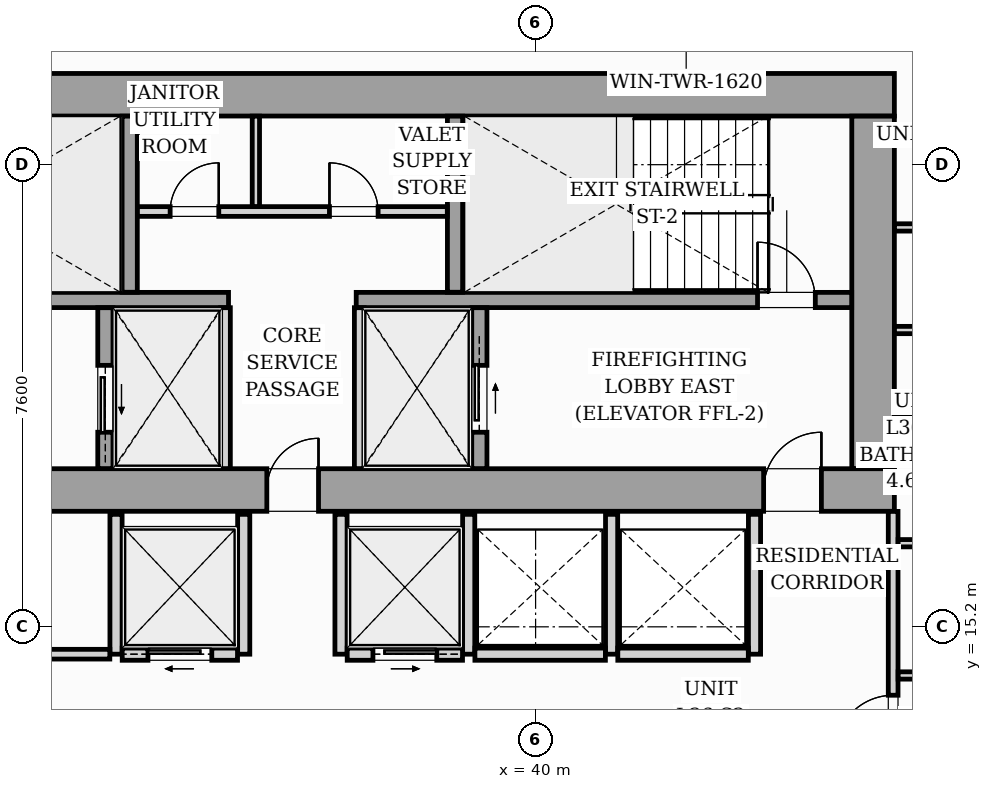
"""IFC4 building model, lengths in metres.
Left out: names, types, materials, properties, quantities, classifications, styles, units other than length and angle.
Written with IfcOpenShell. Run it as: python <this file> out.ifc"""

import sys

from ifc_helpers import new_model, si_unit, direction, frame, frame_2d, origin, origin_2d, place, context, subcontext, project, spatial, rectangle, i_section, extrude, source, transform, mapped, element, fill, save


model = new_model("IFC4")
c1 = context("Model", 3, precision=1e-05, world=origin(), true_north=direction((0.0, 1.0)))
c2 = subcontext(c1, "Body", "Model", "MODEL_VIEW")
j1 = project(units=[si_unit("LENGTHUNIT", "METRE"), si_unit("PLANEANGLEUNIT", "RADIAN")], contexts=[c1])
p1 = place(None, origin())
s1 = spatial("IfcSite", under=j1, at=p1, CompositionType="ELEMENT")
p2 = place(p1, origin())
s2 = spatial("IfcBuilding", under=s1, at=p2, CompositionType="ELEMENT")
p3 = place(p2, frame((0.0, 0.0, 127.8)))
s3 = spatial("IfcBuildingStorey", under=s2, at=p3, CompositionType="ELEMENT", Elevation=127.8)
m1 = source(origin(), c2, "Body", "SweptSolid", [
    extrude(i_section(OverallWidth=0.421, OverallDepth=0.465, WebThickness=0.045, FlangeThickness=0.073, FilletRadius=0.018, at=origin_2d()), origin(), (0.0, 0.0, 1.0), 3.196),
])
for number, where, z_axis, x_axis in (
    (1, (33.12, 17.4, 0.002), (0.0, 0.0, 1.0), (1.0, 0.0, 0.0)),
    (2, (38.88, 17.4, 0.002), (0.0, 0.0, 1.0), (1.0, 0.0, 0.0)),
    (3, (45.6, 17.4, 0.002), (0.0, 0.0, 1.0), (1.0, 0.0, 0.0)),
    (4, (33.12, 24.0, 0.002), (0.0, 0.0, 1.0), (1.0, 0.0, 0.0)),
    (5, (38.88, 24.0, 0.002), (0.0, 0.0, 1.0), (1.0, 0.0, 0.0)),
    (6, (45.6, 24.0, 0.002), (0.0, 0.0, 1.0), (1.0, 0.0, 0.0)),
):
    element("IfcColumn", number, at=place(p3, frame(where, z_axis=z_axis, x_axis=x_axis)), inside=s3, PredefinedType="PILASTER", context=c2, shape_type="MappedRepresentation", body=[
        mapped(m1, transform((0.0, 0.0, 0.0), scale=1.0)),
    ])
p4 = place(p3, frame((40.983, 25.727, 0.0), z_axis=(0.0, 0.0, 1.0), x_axis=(0.995395844771, -0.095849424686, 0.0)))
e7 = element("IfcWall", 7, at=p4, inside=s3, PredefinedType="STANDARD", context=c2, shape_type="SweptSolid", body=[
    extrude(rectangle(XDim=17.01, YDim=0.26, at=frame_2d((8.505, 0.0))), origin(), (0.0, 0.0, 1.0), 2.94),
])
p5 = place(p4, frame((9.25, 0.0, 0.0)))
e8 = element("IfcOpeningElement", 8, at=p5, cuts=e7, PredefinedType="OPENING", context=c2, shape_type="SweptSolid", body=[
    extrude(rectangle(XDim=1.8, YDim=2.06, at=frame_2d((0.9, 1.03))), frame((0.0, 0.14, 0.0), z_axis=(0.0, -1.0, 0.0), x_axis=(1.0, 0.0, 0.0)), (0.0, 0.0, 1.0), 0.28),
])
p6 = place(p4, frame((0.7, 0.0, 0.65)))
e9 = element("IfcOpeningElement", 9, at=p6, cuts=e7, PredefinedType="OPENING", context=c2, shape_type="SweptSolid", body=[
    extrude(rectangle(XDim=1.6, YDim=1.5, at=frame_2d((0.8, 0.75))), frame((0.0, 0.14, 0.0), z_axis=(0.0, -1.0, 0.0), x_axis=(1.0, 0.0, 0.0)), (0.0, 0.0, 1.0), 0.28),
])
p7 = place(p3, frame((26.1, 17.45, 0.0), z_axis=(0.0, 0.0, 1.0), x_axis=(1.0, 0.0, 0.0)))
e10 = element("IfcWall", 10, at=p7, inside=s3, PredefinedType="SHEAR", context=c2, shape_type="SweptSolid", body=[
    extrude(rectangle(XDim=19.8, YDim=0.7, at=frame_2d((9.9, 0.0))), origin(), (0.0, 0.0, 1.0), 3.2),
])
p8 = place(p7, frame((1.05, 0.0, 0.0)))
e11 = element("IfcOpeningElement", 11, at=p8, cuts=e10, PredefinedType="OPENING", context=c2, shape_type="SweptSolid", body=[
    extrude(rectangle(XDim=0.95, YDim=2.06, at=frame_2d((0.475, 1.03))), frame((0.0, 0.36, 0.0), z_axis=(0.0, -1.0, 0.0), x_axis=(1.0, 0.0, 0.0)), (0.0, 0.0, 1.0), 0.72),
])
p9 = place(p7, frame((9.48, 0.0, 0.0)))
e12 = element("IfcOpeningElement", 12, at=p9, cuts=e10, PredefinedType="OPENING", context=c2, shape_type="SweptSolid", body=[
    extrude(rectangle(XDim=0.85, YDim=2.0, at=frame_2d((0.425, 1.0))), frame((0.0, 0.36, 0.0), z_axis=(0.0, -1.0, 0.0), x_axis=(1.0, 0.0, 0.0)), (0.0, 0.0, 1.0), 0.72),
])
p10 = place(p7, frame((17.65, 0.0, 0.0)))
e13 = element("IfcOpeningElement", 13, at=p10, cuts=e10, PredefinedType="OPENING", context=c2, shape_type="SweptSolid", body=[
    extrude(rectangle(XDim=0.95, YDim=2.06, at=frame_2d((0.475, 1.03))), frame((0.0, 0.36, 0.0), z_axis=(0.0, -1.0, 0.0), x_axis=(1.0, 0.0, 0.0)), (0.0, 0.0, 1.0), 0.72),
])
p11 = place(p3, frame((26.1, 23.95, 0.0), z_axis=(0.0, 0.0, 1.0), x_axis=(1.0, 0.0, 0.0)))
e14 = element("IfcWall", 14, at=p11, inside=s3, PredefinedType="SHEAR", context=c2, shape_type="SweptSolid", body=[
    extrude(rectangle(XDim=19.8, YDim=0.7, at=frame_2d((9.9, 0.0))), origin(), (0.0, 0.0, 1.0), 3.2),
])
p12 = place(p3, frame((45.55, 17.802, 0.0), z_axis=(0.0, 0.0, 1.0), x_axis=(0.0, 1.0, 0.0)))
e15 = element("IfcWall", 15, at=p12, inside=s3, PredefinedType="SHEAR", context=c2, shape_type="SweptSolid", body=[
    extrude(rectangle(XDim=5.796, YDim=0.7, at=frame_2d((2.898, 0.0))), origin(), (0.0, 0.0, 1.0), 3.2),
])
p13 = place(p3, frame((26.802, 20.575, 0.0), z_axis=(0.0, 0.0, 1.0), x_axis=(1.0, 0.0, 0.0)))
e16 = element("IfcWall", 16, at=p13, inside=s3, PredefinedType="SOLIDWALL", context=c2, shape_type="SweptSolid", body=[
    extrude(rectangle(XDim=8.148, YDim=0.25, at=frame_2d((4.074, 0.0))), origin(), (0.0, 0.0, 1.0), 3.2),
])
p14 = place(p13, frame((0.348, 0.0, 0.0)))
e17 = element("IfcOpeningElement", 17, at=p14, cuts=e16, PredefinedType="OPENING", context=c2, shape_type="SweptSolid", body=[
    extrude(rectangle(XDim=0.95, YDim=2.06, at=frame_2d((0.475, 1.03))), frame((0.0, 0.135, 0.0), z_axis=(0.0, -1.0, 0.0), x_axis=(1.0, 0.0, 0.0)), (0.0, 0.0, 1.0), 0.27),
])
p15 = place(p3, frame((37.05, 20.575, 0.0), z_axis=(0.0, 0.0, 1.0), x_axis=(1.0, 0.0, 0.0)))
e18 = element("IfcWall", 18, at=p15, inside=s3, PredefinedType="SOLIDWALL", context=c2, shape_type="SweptSolid", body=[
    extrude(rectangle(XDim=8.148, YDim=0.25, at=frame_2d((4.074, 0.0))), origin(), (0.0, 0.0, 1.0), 3.2),
])
p16 = place(p15, frame((6.6, 0.0, 0.0)))
e19 = element("IfcOpeningElement", 19, at=p16, cuts=e18, PredefinedType="OPENING", context=c2, shape_type="SweptSolid", body=[
    extrude(rectangle(XDim=0.95, YDim=2.06, at=frame_2d((0.475, 1.03))), frame((0.0, 0.135, 0.0), z_axis=(0.0, -1.0, 0.0), x_axis=(1.0, 0.0, 0.0)), (0.0, 0.0, 1.0), 0.27),
])
for number, where, z_axis, x_axis in (
    (20, (33.325, 20.702, 0.0), (0.0, 0.0, 1.0), (0.0, 1.0, 0.0)),
    (21, (38.675, 20.702, 0.0), (0.0, 0.0, 1.0), (0.0, 1.0, 0.0)),
):
    element("IfcWall", number, at=place(p3, frame(where, z_axis=z_axis, x_axis=x_axis)), inside=s3, PredefinedType="SOLIDWALL", context=c2, shape_type="SweptSolid", body=[
        extrude(rectangle(XDim=2.896, YDim=0.25, at=frame_2d((1.448, 0.0))), origin(), (0.0, 0.0, 1.0), 3.2),
    ])
p17 = place(p3, frame((32.925, 17.802, 0.0), z_axis=(0.0, 0.0, 1.0), x_axis=(0.0, 1.0, 0.0)))
e22 = element("IfcWall", 22, at=p17, inside=s3, PredefinedType="SOLIDWALL", context=c2, shape_type="SweptSolid", body=[
    extrude(rectangle(XDim=2.646, YDim=0.25, at=frame_2d((1.323, 0.0))), origin(), (0.0, 0.0, 1.0), 3.2),
])
p18 = place(p17, frame((0.598, 0.0, 0.0)))
e23 = element("IfcOpeningElement", 23, at=p18, cuts=e22, PredefinedType="OPENING", context=c2, shape_type="SweptSolid", body=[
    extrude(rectangle(XDim=1.1, YDim=2.08, at=frame_2d((0.55, 1.04))), frame((0.0, 0.135, 0.0), z_axis=(0.0, -1.0, 0.0), x_axis=(1.0, 0.0, 0.0)), (0.0, 0.0, 1.0), 0.27),
])
for number, where, z_axis, x_axis in (
    (24, (34.9, 17.802, 0.0), (0.0, 0.0, 1.0), (0.0, 1.0, 0.0)),
    (25, (37.1, 17.802, 0.0), (0.0, 0.0, 1.0), (0.0, 1.0, 0.0)),
):
    element("IfcWall", number, at=place(p3, frame(where, z_axis=z_axis, x_axis=x_axis)), inside=s3, PredefinedType="PARTITIONING", context=c2, shape_type="SweptSolid", body=[
        extrude(rectangle(XDim=2.646, YDim=0.16, at=frame_2d((1.323, 0.0))), origin(), (0.0, 0.0, 1.0), 2.94),
    ])
p19 = place(p3, frame((39.075, 17.802, 0.0), z_axis=(0.0, 0.0, 1.0), x_axis=(0.0, 1.0, 0.0)))
e26 = element("IfcWall", 26, at=p19, inside=s3, PredefinedType="SOLIDWALL", context=c2, shape_type="SweptSolid", body=[
    extrude(rectangle(XDim=2.646, YDim=0.25, at=frame_2d((1.323, 0.0))), origin(), (0.0, 0.0, 1.0), 3.2),
])
p20 = place(p19, frame((0.598, 0.0, 0.0)))
e27 = element("IfcOpeningElement", 27, at=p20, cuts=e26, PredefinedType="OPENING", context=c2, shape_type="SweptSolid", body=[
    extrude(rectangle(XDim=1.1, YDim=2.08, at=frame_2d((0.55, 1.04))), frame((0.0, 0.135, 0.0), z_axis=(0.0, -1.0, 0.0), x_axis=(1.0, 0.0, 0.0)), (0.0, 0.0, 1.0), 0.27),
])
p21 = place(p3, frame((33.452, 22.03, 0.0), z_axis=(0.0, 0.0, 1.0), x_axis=(1.0, 0.0, 0.0)))
e28 = element("IfcWall", 28, at=p21, inside=s3, PredefinedType="PARTITIONING", context=c2, shape_type="SweptSolid", body=[
    extrude(rectangle(XDim=5.096, YDim=0.16, at=frame_2d((2.548, 0.0))), origin(), (0.0, 0.0, 1.0), 2.94),
])
p22 = place(p21, frame((0.538, 0.0, 0.0)))
e29 = element("IfcOpeningElement", 29, at=p22, cuts=e28, PredefinedType="OPENING", context=c2, shape_type="SweptSolid", body=[
    extrude(rectangle(XDim=0.8, YDim=2.05, at=frame_2d((0.4, 1.025))), frame((0.0, 0.09, 0.0), z_axis=(0.0, -1.0, 0.0), x_axis=(1.0, 0.0, 0.0)), (0.0, 0.0, 1.0), 0.18),
])
p23 = place(p21, frame((3.158, 0.0, 0.0)))
e30 = element("IfcOpeningElement", 30, at=p23, cuts=e28, PredefinedType="OPENING", context=c2, shape_type="SweptSolid", body=[
    extrude(rectangle(XDim=0.8, YDim=2.05, at=frame_2d((0.4, 1.025))), frame((0.0, 0.09, 0.0), z_axis=(0.0, -1.0, 0.0), x_axis=(1.0, 0.0, 0.0)), (0.0, 0.0, 1.0), 0.18),
])
p24 = place(p3, frame((35.4, 22.112, 0.0), z_axis=(0.0, 0.0, 1.0), x_axis=(0.0, 1.0, 0.0)))
e31 = element("IfcWall", 31, at=p24, inside=s3, PredefinedType="PARTITIONING", context=c2, shape_type="SweptSolid", body=[
    extrude(rectangle(XDim=1.486, YDim=0.12, at=frame_2d((0.743, 0.0))), origin(), (0.0, 0.0, 1.0), 2.94),
])
p25 = place(p3, frame((33.1, 14.75, 0.0), z_axis=(0.0, 0.0, 1.0), x_axis=(0.0, 1.0, 0.0)))
e32 = element("IfcWall", 32, at=p25, inside=s3, PredefinedType="PARTITIONING", context=c2, shape_type="SweptSolid", body=[
    extrude(rectangle(XDim=2.3, YDim=0.2, at=frame_2d((1.15, 0.0))), origin(), (0.0, 0.0, 1.0), 2.94),
])
p26 = place(p3, frame((28.482, 14.75, 0.0), z_axis=(0.0, 0.0, 1.0), x_axis=(1.0, 0.0, 0.0)))
e33 = element("IfcWall", 33, at=p26, inside=s3, PredefinedType="PARTITIONING", context=c2, shape_type="SweptSolid", body=[
    extrude(rectangle(XDim=4.516, YDim=0.16, at=frame_2d((2.258, 0.0))), origin(), (0.0, 0.0, 1.0), 2.94),
])
p27 = place(p26, frame((1.868, 0.0, 0.0)))
e34 = element("IfcOpeningElement", 34, at=p27, cuts=e33, PredefinedType="OPENING", context=c2, shape_type="SweptSolid", body=[
    extrude(rectangle(XDim=0.8, YDim=2.05, at=frame_2d((0.4, 1.025))), frame((0.0, 0.09, 0.0), z_axis=(0.0, -1.0, 0.0), x_axis=(1.0, 0.0, 0.0)), (0.0, 0.0, 1.0), 0.18),
])
p28 = place(p3, frame((35.2, 14.75, 0.0), z_axis=(0.0, 0.0, 1.0), x_axis=(0.0, 1.0, 0.0)))
e35 = element("IfcWall", 35, at=p28, inside=s3, PredefinedType="PARTITIONING", context=c2, shape_type="SweptSolid", body=[
    extrude(rectangle(XDim=2.3, YDim=0.2, at=frame_2d((1.15, 0.0))), origin(), (0.0, 0.0, 1.0), 2.94),
])
p29 = place(p3, frame((33.202, 14.75, 0.0), z_axis=(0.0, 0.0, 1.0), x_axis=(1.0, 0.0, 0.0)))
e36 = element("IfcWall", 36, at=p29, inside=s3, PredefinedType="PARTITIONING", context=c2, shape_type="SweptSolid", body=[
    extrude(rectangle(XDim=1.896, YDim=0.2, at=frame_2d((0.948, 0.0))), origin(), (0.0, 0.0, 1.0), 2.94),
])
p30 = place(p29, frame((0.423, 0.0, 0.0)))
e37 = element("IfcOpeningElement", 37, at=p30, cuts=e36, PredefinedType="OPENING", context=c2, shape_type="SweptSolid", body=[
    extrude(rectangle(XDim=1.05, YDim=2.08, at=frame_2d((0.525, 1.04))), frame((0.0, 0.11, 0.0), z_axis=(0.0, -1.0, 0.0), x_axis=(1.0, 0.0, 0.0)), (0.0, 0.0, 1.0), 0.22),
])
for number, where, z_axis, x_axis in (
    (38, (36.8, 14.75, 0.0), (0.0, 0.0, 1.0), (0.0, 1.0, 0.0)),
    (39, (38.9, 14.75, 0.0), (0.0, 0.0, 1.0), (0.0, 1.0, 0.0)),
):
    element("IfcWall", number, at=place(p3, frame(where, z_axis=z_axis, x_axis=x_axis)), inside=s3, PredefinedType="PARTITIONING", context=c2, shape_type="SweptSolid", body=[
        extrude(rectangle(XDim=2.3, YDim=0.2, at=frame_2d((1.15, 0.0))), origin(), (0.0, 0.0, 1.0), 2.94),
    ])
p31 = place(p3, frame((36.902, 14.75, 0.0), z_axis=(0.0, 0.0, 1.0), x_axis=(1.0, 0.0, 0.0)))
e40 = element("IfcWall", 40, at=p31, inside=s3, PredefinedType="PARTITIONING", context=c2, shape_type="SweptSolid", body=[
    extrude(rectangle(XDim=1.896, YDim=0.2, at=frame_2d((0.948, 0.0))), origin(), (0.0, 0.0, 1.0), 2.94),
])
p32 = place(p31, frame((0.423, 0.0, 0.0)))
e41 = element("IfcOpeningElement", 41, at=p32, cuts=e40, PredefinedType="OPENING", context=c2, shape_type="SweptSolid", body=[
    extrude(rectangle(XDim=1.05, YDim=2.08, at=frame_2d((0.525, 1.04))), frame((0.0, 0.11, 0.0), z_axis=(0.0, -1.0, 0.0), x_axis=(1.0, 0.0, 0.0)), (0.0, 0.0, 1.0), 0.22),
])
for number, where, z_axis, x_axis in (
    (42, (41.25, 14.75, 0.0), (0.0, 0.0, 1.0), (0.0, 1.0, 0.0)),
    (43, (43.6, 14.75, 0.0), (0.0, 0.0, 1.0), (0.0, 1.0, 0.0)),
):
    element("IfcWall", number, at=place(p3, frame(where, z_axis=z_axis, x_axis=x_axis)), inside=s3, PredefinedType="PARTITIONING", context=c2, shape_type="SweptSolid", body=[
        extrude(rectangle(XDim=2.3, YDim=0.2, at=frame_2d((1.15, 0.0))), origin(), (0.0, 0.0, 1.0), 2.94),
    ])
for number, where, z_axis, x_axis in (
    (44, (39.002, 14.75, 0.0), (0.0, 0.0, 1.0), (1.0, 0.0, 0.0)),
    (45, (41.352, 14.75, 0.0), (0.0, 0.0, 1.0), (1.0, 0.0, 0.0)),
):
    element("IfcWall", number, at=place(p3, frame(where, z_axis=z_axis, x_axis=x_axis)), inside=s3, PredefinedType="PARTITIONING", context=c2, shape_type="SweptSolid", body=[
        extrude(rectangle(XDim=2.146, YDim=0.2, at=frame_2d((1.073, 0.0))), origin(), (0.0, 0.0, 1.0), 2.94),
    ])
p33 = place(p3, frame((45.88, 12.632, 0.0), z_axis=(0.0, 0.0, 1.0), x_axis=(0.0, 1.0, 0.0)))
e46 = element("IfcWall", 46, at=p33, inside=s3, PredefinedType="PARTITIONING", context=c2, shape_type="SweptSolid", body=[
    extrude(rectangle(XDim=4.466, YDim=0.16, at=frame_2d((2.233, 0.0))), origin(), (0.0, 0.0, 1.0), 2.94),
])
p34 = place(p33, frame((0.493, 0.0, 0.0)))
e47 = element("IfcOpeningElement", 47, at=p34, cuts=e46, PredefinedType="OPENING", context=c2, shape_type="SweptSolid", body=[
    extrude(rectangle(XDim=0.95, YDim=2.06, at=frame_2d((0.475, 1.03))), frame((0.0, 0.09, 0.0), z_axis=(0.0, -1.0, 0.0), x_axis=(1.0, 0.0, 0.0)), (0.0, 0.0, 1.0), 0.18),
])
for number, where, z_axis, x_axis in (
    (48, (45.962, 16.575, 0.0), (0.0, 0.0, 1.0), (1.0, 0.0, 0.0)),
    (49, (45.962, 14.4, 0.0), (0.0, 0.0, 1.0), (1.0, 0.0, 0.0)),
):
    element("IfcWall", number, at=place(p3, frame(where, z_axis=z_axis, x_axis=x_axis)), inside=s3, PredefinedType="PARTITIONING", context=c2, shape_type="SweptSolid", body=[
        extrude(rectangle(XDim=2.256, YDim=0.12, at=frame_2d((1.128, 0.0))), origin(), (0.0, 0.0, 1.0), 2.94),
    ])
p35 = place(p3, frame((45.902, 18.75, 0.0), z_axis=(0.0, 0.0, 1.0), x_axis=(1.0, 0.0, 0.0)))
e50 = element("IfcWall", 50, at=p35, inside=s3, PredefinedType="PARTITIONING", context=c2, shape_type="SweptSolid", body=[
    extrude(rectangle(XDim=2.316, YDim=0.12, at=frame_2d((1.158, 0.0))), origin(), (0.0, 0.0, 1.0), 2.94),
])
p36 = place(p3, frame((45.902, 21.768, 0.0), z_axis=(0.0, 0.0, 1.0), x_axis=(1.0, 0.0, 0.0)))
e51 = element("IfcWall", 51, at=p36, inside=s3, PredefinedType="PARTITIONING", context=c2, shape_type="SweptSolid", body=[
    extrude(rectangle(XDim=12.781, YDim=0.12, at=frame_2d((6.391, 0.0))), origin(), (0.0, 0.0, 1.0), 2.94),
])
p37 = place(p36, frame((6.146, 0.0, 0.0)))
e52 = element("IfcOpeningElement", 52, at=p37, cuts=e51, PredefinedType="OPENING", context=c2, shape_type="SweptSolid", body=[
    extrude(rectangle(XDim=0.85, YDim=2.05, at=frame_2d((0.425, 1.025))), frame((0.0, 0.07, 0.0), z_axis=(0.0, -1.0, 0.0), x_axis=(1.0, 0.0, 0.0)), (0.0, 0.0, 1.0), 0.14),
])
p38 = place(p3, frame((45.902, 20.081, 0.0), z_axis=(0.0, 0.0, 1.0), x_axis=(1.0, 0.0, 0.0)))
e53 = element("IfcWall", 53, at=p38, inside=s3, PredefinedType="PARTITIONING", context=c2, shape_type="SweptSolid", body=[
    extrude(rectangle(XDim=14.057, YDim=0.12, at=frame_2d((7.029, 0.0))), origin(), (0.0, 0.0, 1.0), 2.94),
])
p39 = place(p38, frame((6.708, 0.0, 0.0)))
e54 = element("IfcOpeningElement", 54, at=p39, cuts=e53, PredefinedType="OPENING", context=c2, shape_type="SweptSolid", body=[
    extrude(rectangle(XDim=0.85, YDim=2.05, at=frame_2d((0.425, 1.025))), frame((0.0, 0.07, 0.0), z_axis=(0.0, -1.0, 0.0), x_axis=(1.0, 0.0, 0.0)), (0.0, 0.0, 1.0), 0.14),
])
m2 = source(origin(), c2, "Body", "SweptSolid", [
    extrude(rectangle(XDim=0.85, YDim=2.0, at=frame_2d((0.425, 1.0))), frame((0.0, 0.025, 0.0), z_axis=(0.0, -1.0, 0.0), x_axis=(1.0, 0.0, 0.0)), (0.0, 0.0, 1.0), 0.05),
])
p40 = place(p9, origin())
e55 = element("IfcDoor", 55, at=p40, inside=s3, OperationType="SINGLE_SWING_RIGHT", PredefinedType="DOOR", context=c2, shape_type="MappedRepresentation", body=[
    mapped(m2, transform((0.0, 0.0, 0.0), scale=1.0)),
])
fill(e12, e55)
m3 = source(origin(), c2, "Body", "SweptSolid", [
    extrude(rectangle(XDim=0.95, YDim=2.06, at=frame_2d((0.475, 1.03))), frame((0.0, 0.025, 0.0), z_axis=(0.0, -1.0, 0.0), x_axis=(1.0, 0.0, 0.0)), (0.0, 0.0, 1.0), 0.05),
])
p41 = place(p10, origin())
e56 = element("IfcDoor", 56, at=p41, inside=s3, OperationType="SINGLE_SWING_RIGHT", PredefinedType="DOOR", context=c2, shape_type="MappedRepresentation", body=[
    mapped(m3, transform((0.0, 0.0, 0.0), scale=1.0)),
])
fill(e13, e56)
p42 = place(p16, origin())
e57 = element("IfcDoor", 57, at=p42, inside=s3, OperationType="SINGLE_SWING_LEFT", PredefinedType="DOOR", context=c2, shape_type="MappedRepresentation", body=[
    mapped(m3, transform((0.0, 0.0, 0.0), scale=1.0)),
])
fill(e19, e57)
m4 = source(origin(), c2, "Body", "SweptSolid", [
    extrude(rectangle(XDim=1.1, YDim=2.08, at=frame_2d((0.55, 1.04))), frame((0.0, 0.025, 0.0), z_axis=(0.0, -1.0, 0.0), x_axis=(1.0, 0.0, 0.0)), (0.0, 0.0, 1.0), 0.05),
])
p43 = place(p18, origin())
e58 = element("IfcDoor", 58, at=p43, inside=s3, OperationType="SLIDING_TO_LEFT", PredefinedType="DOOR", context=c2, shape_type="MappedRepresentation", body=[
    mapped(m4, transform((0.0, 0.0, 0.0), scale=1.0)),
])
fill(e23, e58)
p44 = place(p20, origin())
e59 = element("IfcDoor", 59, at=p44, inside=s3, OperationType="SLIDING_TO_RIGHT", PredefinedType="DOOR", context=c2, shape_type="MappedRepresentation", body=[
    mapped(m4, transform((0.0, 0.0, 0.0), scale=1.0)),
])
fill(e27, e59)
m5 = source(origin(), c2, "Body", "SweptSolid", [
    extrude(rectangle(XDim=0.8, YDim=2.05, at=frame_2d((0.4, 1.025))), frame((0.0, 0.025, 0.0), z_axis=(0.0, -1.0, 0.0), x_axis=(1.0, 0.0, 0.0)), (0.0, 0.0, 1.0), 0.05),
])
p45 = place(p22, origin())
e60 = element("IfcDoor", 60, at=p45, inside=s3, OperationType="SINGLE_SWING_RIGHT", PredefinedType="DOOR", context=c2, shape_type="MappedRepresentation", body=[
    mapped(m5, transform((0.0, 0.0, 0.0), scale=1.0)),
])
fill(e29, e60)
p46 = place(p23, origin())
e61 = element("IfcDoor", 61, at=p46, inside=s3, OperationType="SINGLE_SWING_LEFT", PredefinedType="DOOR", context=c2, shape_type="MappedRepresentation", body=[
    mapped(m5, transform((0.0, 0.0, 0.0), scale=1.0)),
])
fill(e30, e61)
m6 = source(origin(), c2, "Body", "SweptSolid", [
    extrude(rectangle(XDim=1.05, YDim=2.08, at=frame_2d((0.525, 1.04))), frame((0.0, 0.025, 0.0), z_axis=(0.0, -1.0, 0.0), x_axis=(1.0, 0.0, 0.0)), (0.0, 0.0, 1.0), 0.05),
])
p47 = place(p30, origin())
e62 = element("IfcDoor", 62, at=p47, inside=s3, OperationType="SLIDING_TO_LEFT", PredefinedType="DOOR", context=c2, shape_type="MappedRepresentation", body=[
    mapped(m6, transform((0.0, 0.0, 0.0), scale=1.0)),
])
fill(e37, e62)
p48 = place(p32, origin())
e63 = element("IfcDoor", 63, at=p48, inside=s3, OperationType="SLIDING_TO_RIGHT", PredefinedType="DOOR", context=c2, shape_type="MappedRepresentation", body=[
    mapped(m6, transform((0.0, 0.0, 0.0), scale=1.0)),
])
fill(e41, e63)
m7 = source(origin(), c2, "Body", "SweptSolid", [
    extrude(rectangle(XDim=0.95, YDim=2.06, at=frame_2d((0.475, 1.03))), frame((0.0, 0.025, 0.0), z_axis=(0.0, -1.0, 0.0), x_axis=(1.0, 0.0, 0.0)), (0.0, 0.0, 1.0), 0.05),
])
p49 = place(p34, origin())
e64 = element("IfcDoor", 64, at=p49, inside=s3, OperationType="SINGLE_SWING_LEFT", PredefinedType="DOOR", context=c2, shape_type="MappedRepresentation", body=[
    mapped(m7, transform((0.0, 0.0, 0.0), scale=1.0)),
])
fill(e47, e64)
save(model, sys.argv[1])
